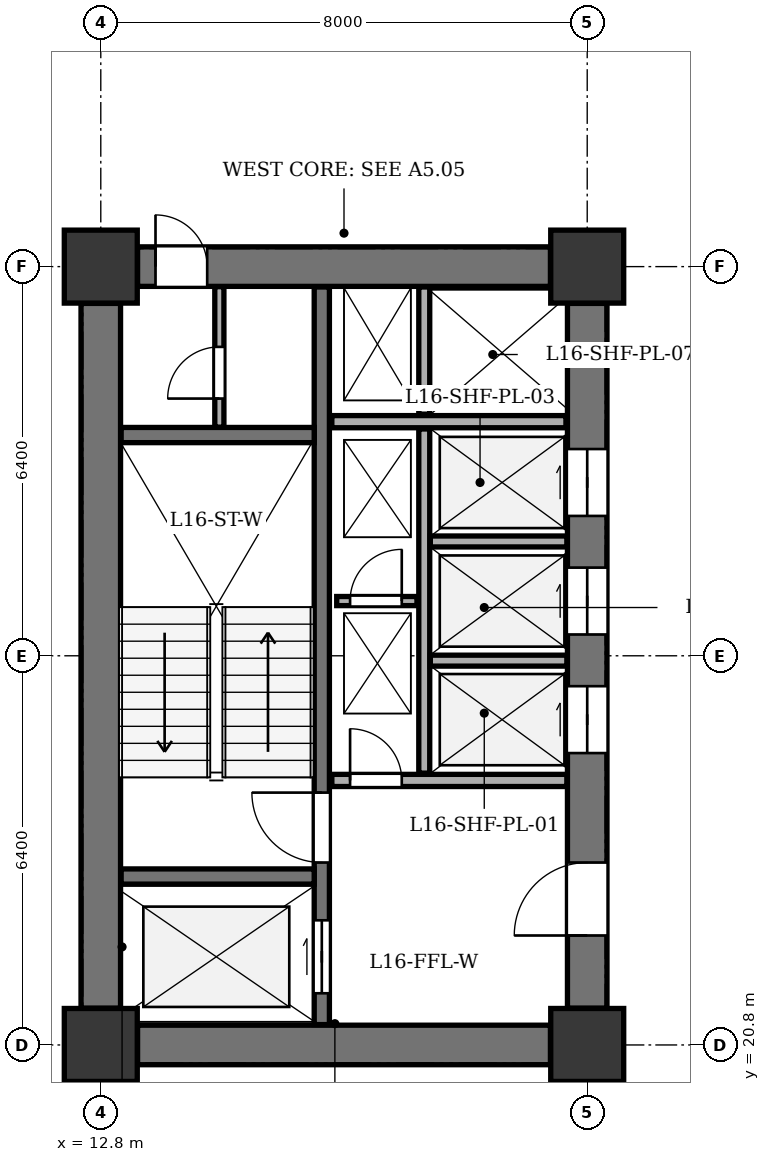
"""IFC4 building model, lengths in metres.
Left out: names, types, materials, properties, quantities, classifications, styles, units other than length and angle.
Written with IfcOpenShell. Run it as: python <this file> out.ifc"""

import sys

from ifc_helpers import new_model, si_unit, direction, frame, frame_2d, origin, origin_2d, place, context, subcontext, project, spatial, rectangle, extrude, element, fill, save


model = new_model("IFC4")
c1 = context("Model", 3, precision=1e-05, world=origin(), true_north=direction((0.0, 1.0)))
c2 = subcontext(c1, "Body", "Model", "MODEL_VIEW")
j1 = project(units=[si_unit("LENGTHUNIT", "METRE"), si_unit("PLANEANGLEUNIT", "RADIAN")], contexts=[c1])
p1 = place(None, origin())
s1 = spatial("IfcSite", under=j1, at=p1, CompositionType="ELEMENT")
p2 = place(p1, origin())
s2 = spatial("IfcBuilding", under=s1, at=p2, CompositionType="ELEMENT")
p3 = place(p2, frame((0.0, 0.0, 67.2)))
s3 = spatial("IfcBuildingStorey", under=s2, at=p3, CompositionType="ELEMENT", Elevation=67.2)
for number, where, z_axis, x_axis in (
    (1, (12.8, 20.8, 0.0), (0.0, 0.0, 1.0), (1.0, 0.0, 0.0)),
    (2, (20.8, 20.8, 0.0), (0.0, 0.0, 1.0), (1.0, 0.0, 0.0)),
    (3, (12.8, 33.6, 0.0), (0.0, 0.0, 1.0), (1.0, 0.0, 0.0)),
    (4, (20.8, 33.6, 0.0), (0.0, 0.0, 1.0), (1.0, 0.0, 0.0)),
):
    element("IfcColumn", number, at=place(p3, frame(where, z_axis=z_axis, x_axis=x_axis)), inside=s3, PredefinedType="COLUMN", context=c2, shape_type="SweptSolid", body=[
        extrude(rectangle(XDim=1.2, YDim=1.2, at=origin_2d()), origin(), (0.0, 0.0, 1.0), 3.9),
    ])
p4 = place(p3, frame((12.8, 21.405, 0.0), z_axis=(0.0, 0.0, 1.0), x_axis=(0.0, 1.0, 0.0)))
e5 = element("IfcWall", 5, at=p4, inside=s3, PredefinedType="SHEAR", context=c2, shape_type="SweptSolid", body=[
    extrude(rectangle(XDim=11.59, YDim=0.65, at=frame_2d((5.795, 0.0))), origin(), (0.0, 0.0, 1.0), 3.45),
])
p5 = place(p3, frame((13.405, 20.8, 0.0), z_axis=(0.0, 0.0, 1.0), x_axis=(1.0, 0.0, 0.0)))
e6 = element("IfcWall", 6, at=p5, inside=s3, PredefinedType="SHEAR", context=c2, shape_type="SweptSolid", body=[
    extrude(rectangle(XDim=6.79, YDim=0.65, at=frame_2d((3.395, 0.0))), origin(), (0.0, 0.0, 1.0), 3.45),
])
p6 = place(p3, frame((13.405, 33.6, 0.0), z_axis=(0.0, 0.0, 1.0), x_axis=(1.0, 0.0, 0.0)))
e7 = element("IfcWall", 7, at=p6, inside=s3, PredefinedType="SHEAR", context=c2, shape_type="SweptSolid", body=[
    extrude(rectangle(XDim=6.79, YDim=0.65, at=frame_2d((3.395, 0.0))), origin(), (0.0, 0.0, 1.0), 3.45),
])
p7 = place(p6, frame((0.295, 0.0, 0.0)))
e8 = element("IfcOpeningElement", 8, at=p7, cuts=e7, PredefinedType="OPENING", context=c2, shape_type="SweptSolid", body=[
    extrude(rectangle(XDim=0.85, YDim=2.02, at=frame_2d((0.425, 1.01))), frame((0.0, 0.335, 0.0), z_axis=(0.0, -1.0, 0.0), x_axis=(1.0, 0.0, 0.0)), (0.0, 0.0, 1.0), 0.67),
])
p8 = place(p3, frame((20.8, 21.405, 0.0), z_axis=(0.0, 0.0, 1.0), x_axis=(0.0, 1.0, 0.0)))
e9 = element("IfcWall", 9, at=p8, inside=s3, PredefinedType="SHEAR", context=c2, shape_type="SweptSolid", body=[
    extrude(rectangle(XDim=11.59, YDim=0.65, at=frame_2d((5.795, 0.0))), origin(), (0.0, 0.0, 1.0), 3.45),
])
p9 = place(p8, frame((1.195, 0.0, 0.0)))
e10 = element("IfcOpeningElement", 10, at=p9, cuts=e9, PredefinedType="OPENING", context=c2, shape_type="SweptSolid", body=[
    extrude(rectangle(XDim=1.2, YDim=2.15, at=frame_2d((0.6, 1.075))), frame((0.0, 0.335, 0.0), z_axis=(0.0, -1.0, 0.0), x_axis=(1.0, 0.0, 0.0)), (0.0, 0.0, 1.0), 0.67),
])
p10 = place(p8, frame((4.195, 0.0, 0.0)))
e11 = element("IfcOpeningElement", 11, at=p10, cuts=e9, PredefinedType="OPENING", context=c2, shape_type="SweptSolid", body=[
    extrude(rectangle(XDim=1.1, YDim=2.1, at=frame_2d((0.55, 1.05))), frame((0.0, 0.335, 0.0), z_axis=(0.0, -1.0, 0.0), x_axis=(1.0, 0.0, 0.0)), (0.0, 0.0, 1.0), 0.67),
])
p11 = place(p8, frame((6.145, 0.0, 0.0)))
e12 = element("IfcOpeningElement", 12, at=p11, cuts=e9, PredefinedType="OPENING", context=c2, shape_type="SweptSolid", body=[
    extrude(rectangle(XDim=1.1, YDim=2.1, at=frame_2d((0.55, 1.05))), frame((0.0, 0.335, 0.0), z_axis=(0.0, -1.0, 0.0), x_axis=(1.0, 0.0, 0.0)), (0.0, 0.0, 1.0), 0.67),
])
p12 = place(p8, frame((8.095, 0.0, 0.0)))
e13 = element("IfcOpeningElement", 13, at=p12, cuts=e9, PredefinedType="OPENING", context=c2, shape_type="SweptSolid", body=[
    extrude(rectangle(XDim=1.1, YDim=2.1, at=frame_2d((0.55, 1.05))), frame((0.0, 0.335, 0.0), z_axis=(0.0, -1.0, 0.0), x_axis=(1.0, 0.0, 0.0)), (0.0, 0.0, 1.0), 0.67),
])
p13 = place(p3, frame((16.435, 21.135, 0.0), z_axis=(0.0, 0.0, 1.0), x_axis=(0.0, 1.0, 0.0)))
e14 = element("IfcWall", 14, at=p13, inside=s3, PredefinedType="SHEAR", context=c2, shape_type="SweptSolid", body=[
    extrude(rectangle(XDim=12.13, YDim=0.25, at=frame_2d((6.065, 0.0))), origin(), (0.0, 0.0, 1.0), 3.45),
])
p14 = place(p13, frame((0.515, 0.0, 0.0)))
e15 = element("IfcOpeningElement", 15, at=p14, cuts=e14, PredefinedType="OPENING", context=c2, shape_type="SweptSolid", body=[
    extrude(rectangle(XDim=1.2, YDim=2.15, at=frame_2d((0.6, 1.075))), frame((0.0, 0.135, 0.0), z_axis=(0.0, -1.0, 0.0), x_axis=(1.0, 0.0, 0.0)), (0.0, 0.0, 1.0), 0.27),
])
p15 = place(p13, frame((2.665, 0.0, 0.0)))
e16 = element("IfcOpeningElement", 16, at=p15, cuts=e14, PredefinedType="OPENING", context=c2, shape_type="SweptSolid", body=[
    extrude(rectangle(XDim=1.15, YDim=2.15, at=frame_2d((0.575, 1.075))), frame((0.0, 0.135, 0.0), z_axis=(0.0, -1.0, 0.0), x_axis=(1.0, 0.0, 0.0)), (0.0, 0.0, 1.0), 0.27),
])
for number, where, z_axis, x_axis in (
    (17, (13.135, 23.57, 0.0), (0.0, 0.0, 1.0), (1.0, 0.0, 0.0)),
    (18, (13.135, 30.83, 0.0), (0.0, 0.0, 1.0), (1.0, 0.0, 0.0)),
):
    element("IfcWall", number, at=place(p3, frame(where, z_axis=z_axis, x_axis=x_axis)), inside=s3, PredefinedType="SHEAR", context=c2, shape_type="SweptSolid", body=[
        extrude(rectangle(XDim=3.175, YDim=0.25, at=frame_2d((1.587, 0.0))), origin(), (0.0, 0.0, 1.0), 3.45),
    ])
p16 = place(p3, frame((16.6, 25.15, 0.0), z_axis=(0.0, 0.0, 1.0), x_axis=(1.0, 0.0, 0.0)))
e19 = element("IfcWall", 19, at=p16, inside=s3, PredefinedType="SOLIDWALL", context=c2, shape_type="SweptSolid", body=[
    extrude(rectangle(XDim=3.865, YDim=0.2, at=frame_2d((1.933, 0.0))), origin(), (0.0, 0.0, 1.0), 3.45),
])
p17 = place(p16, frame((0.3, 0.0, 0.0)))
e20 = element("IfcOpeningElement", 20, at=p17, cuts=e19, PredefinedType="OPENING", context=c2, shape_type="SweptSolid", body=[
    extrude(rectangle(XDim=0.85, YDim=2.02, at=frame_2d((0.425, 1.01))), frame((0.0, 0.11, 0.0), z_axis=(0.0, -1.0, 0.0), x_axis=(1.0, 0.0, 0.0)), (0.0, 0.0, 1.0), 0.22),
])
p18 = place(p3, frame((16.6, 31.05, 0.0), z_axis=(0.0, 0.0, 1.0), x_axis=(1.0, 0.0, 0.0)))
e21 = element("IfcWall", 21, at=p18, inside=s3, PredefinedType="SOLIDWALL", context=c2, shape_type="SweptSolid", body=[
    extrude(rectangle(XDim=3.85, YDim=0.2, at=frame_2d((1.925, 0.0))), origin(), (0.0, 0.0, 1.0), 3.45),
])
p19 = place(p3, frame((18.12, 25.27, 0.0), z_axis=(0.0, 0.0, 1.0), x_axis=(0.0, 1.0, 0.0)))
e22 = element("IfcWall", 22, at=p19, inside=s3, PredefinedType="PARTITIONING", context=c2, shape_type="SweptSolid", body=[
    extrude(rectangle(XDim=5.66, YDim=0.18, at=frame_2d((2.83, 0.0))), origin(), (0.0, 0.0, 1.0), 3.45),
])
p20 = place(p3, frame((18.12, 31.17, 0.0), z_axis=(0.0, 0.0, 1.0), x_axis=(0.0, 1.0, 0.0)))
e23 = element("IfcWall", 23, at=p20, inside=s3, PredefinedType="PARTITIONING", context=c2, shape_type="SweptSolid", body=[
    extrude(rectangle(XDim=2.095, YDim=0.18, at=frame_2d((1.047, 0.0))), origin(), (0.0, 0.0, 1.0), 3.45),
])
for number, where, z_axis, x_axis in (
    (24, (18.22, 27.12, 0.0), (0.0, 0.0, 1.0), (1.0, 0.0, 0.0)),
    (25, (18.22, 29.08, 0.0), (0.0, 0.0, 1.0), (1.0, 0.0, 0.0)),
):
    element("IfcWall", number, at=place(p3, frame(where, z_axis=z_axis, x_axis=x_axis)), inside=s3, PredefinedType="PARTITIONING", context=c2, shape_type="SweptSolid", body=[
        extrude(rectangle(XDim=2.245, YDim=0.18, at=frame_2d((1.123, 0.0))), origin(), (0.0, 0.0, 1.0), 3.45),
    ])
p21 = place(p3, frame((14.75, 30.96, 0.0), z_axis=(0.0, 0.0, 1.0), x_axis=(0.0, 1.0, 0.0)))
e26 = element("IfcWall", 26, at=p21, inside=s3, PredefinedType="PARTITIONING", context=c2, shape_type="SweptSolid", body=[
    extrude(rectangle(XDim=2.31, YDim=0.15, at=frame_2d((1.155, 0.0))), origin(), (0.0, 0.0, 1.0), 3.45),
])
p22 = place(p21, frame((0.47, 0.0, 0.0)))
e27 = element("IfcOpeningElement", 27, at=p22, cuts=e26, PredefinedType="OPENING", context=c2, shape_type="SweptSolid", body=[
    extrude(rectangle(XDim=0.85, YDim=2.02, at=frame_2d((0.425, 1.01))), frame((0.0, 0.085, 0.0), z_axis=(0.0, -1.0, 0.0), x_axis=(1.0, 0.0, 0.0)), (0.0, 0.0, 1.0), 0.17),
])
p23 = place(p3, frame((16.68, 28.1, 0.0), z_axis=(0.0, 0.0, 1.0), x_axis=(1.0, 0.0, 0.0)))
e28 = element("IfcWall", 28, at=p23, inside=s3, PredefinedType="PARTITIONING", context=c2, shape_type="SweptSolid", body=[
    extrude(rectangle(XDim=1.32, YDim=0.15, at=frame_2d((0.66, 0.0))), origin(), (0.0, 0.0, 1.0), 3.45),
])
p24 = place(p23, frame((0.22, 0.0, 0.0)))
e29 = element("IfcOpeningElement", 29, at=p24, cuts=e28, PredefinedType="OPENING", context=c2, shape_type="SweptSolid", body=[
    extrude(rectangle(XDim=0.85, YDim=2.02, at=frame_2d((0.425, 1.01))), frame((0.0, 0.085, 0.0), z_axis=(0.0, -1.0, 0.0), x_axis=(1.0, 0.0, 0.0)), (0.0, 0.0, 1.0), 0.17),
])
p25 = place(p7, origin())
e30 = element("IfcDoor", 30, at=p25, inside=s3, OperationType="SINGLE_SWING_LEFT", PredefinedType="DOOR", context=c2, shape_type="SweptSolid", body=[
    extrude(rectangle(XDim=0.85, YDim=2.02, at=frame_2d((0.425, 1.01))), frame((0.0, 0.025, 0.0), z_axis=(0.0, -1.0, 0.0), x_axis=(1.0, 0.0, 0.0)), (0.0, 0.0, 1.0), 0.05),
])
fill(e8, e30)
p26 = place(p9, origin())
e31 = element("IfcDoor", 31, at=p26, inside=s3, OperationType="SINGLE_SWING_LEFT", PredefinedType="DOOR", context=c2, shape_type="SweptSolid", body=[
    extrude(rectangle(XDim=1.2, YDim=2.15, at=frame_2d((0.6, 1.075))), frame((0.0, 0.025, 0.0), z_axis=(0.0, -1.0, 0.0), x_axis=(1.0, 0.0, 0.0)), (0.0, 0.0, 1.0), 0.05),
])
fill(e10, e31)
p27 = place(p10, origin())
e32 = element("IfcDoor", 32, at=p27, inside=s3, OperationType="DOUBLE_DOOR_SLIDING", PredefinedType="DOOR", context=c2, shape_type="SweptSolid", body=[
    extrude(rectangle(XDim=1.1, YDim=2.1, at=frame_2d((0.55, 1.05))), frame((0.0, 0.025, 0.0), z_axis=(0.0, -1.0, 0.0), x_axis=(1.0, 0.0, 0.0)), (0.0, 0.0, 1.0), 0.05),
])
fill(e11, e32)
p28 = place(p11, origin())
e33 = element("IfcDoor", 33, at=p28, inside=s3, OperationType="DOUBLE_DOOR_SLIDING", PredefinedType="DOOR", context=c2, shape_type="SweptSolid", body=[
    extrude(rectangle(XDim=1.1, YDim=2.1, at=frame_2d((0.55, 1.05))), frame((0.0, 0.025, 0.0), z_axis=(0.0, -1.0, 0.0), x_axis=(1.0, 0.0, 0.0)), (0.0, 0.0, 1.0), 0.05),
])
fill(e12, e33)
p29 = place(p12, origin())
e34 = element("IfcDoor", 34, at=p29, inside=s3, OperationType="DOUBLE_DOOR_SLIDING", PredefinedType="DOOR", context=c2, shape_type="SweptSolid", body=[
    extrude(rectangle(XDim=1.1, YDim=2.1, at=frame_2d((0.55, 1.05))), frame((0.0, 0.025, 0.0), z_axis=(0.0, -1.0, 0.0), x_axis=(1.0, 0.0, 0.0)), (0.0, 0.0, 1.0), 0.05),
])
fill(e13, e34)
p30 = place(p14, origin())
e35 = element("IfcDoor", 35, at=p30, inside=s3, OperationType="DOUBLE_DOOR_SLIDING", PredefinedType="DOOR", context=c2, shape_type="SweptSolid", body=[
    extrude(rectangle(XDim=1.2, YDim=2.15, at=frame_2d((0.6, 1.075))), frame((0.0, 0.025, 0.0), z_axis=(0.0, -1.0, 0.0), x_axis=(1.0, 0.0, 0.0)), (0.0, 0.0, 1.0), 0.05),
])
fill(e15, e35)
p31 = place(p15, origin())
e36 = element("IfcDoor", 36, at=p31, inside=s3, OperationType="SINGLE_SWING_RIGHT", PredefinedType="DOOR", context=c2, shape_type="SweptSolid", body=[
    extrude(rectangle(XDim=1.15, YDim=2.15, at=frame_2d((0.575, 1.075))), frame((0.0, 0.025, 0.0), z_axis=(0.0, -1.0, 0.0), x_axis=(1.0, 0.0, 0.0)), (0.0, 0.0, 1.0), 0.05),
])
fill(e16, e36)
p32 = place(p17, origin())
e37 = element("IfcDoor", 37, at=p32, inside=s3, OperationType="SINGLE_SWING_LEFT", PredefinedType="DOOR", context=c2, shape_type="SweptSolid", body=[
    extrude(rectangle(XDim=0.85, YDim=2.02, at=frame_2d((0.425, 1.01))), frame((0.0, 0.025, 0.0), z_axis=(0.0, -1.0, 0.0), x_axis=(1.0, 0.0, 0.0)), (0.0, 0.0, 1.0), 0.05),
])
fill(e20, e37)
p33 = place(p22, origin())
e38 = element("IfcDoor", 38, at=p33, inside=s3, OperationType="SINGLE_SWING_LEFT", PredefinedType="DOOR", context=c2, shape_type="SweptSolid", body=[
    extrude(rectangle(XDim=0.85, YDim=2.02, at=frame_2d((0.425, 1.01))), frame((0.0, 0.025, 0.0), z_axis=(0.0, -1.0, 0.0), x_axis=(1.0, 0.0, 0.0)), (0.0, 0.0, 1.0), 0.05),
])
fill(e27, e38)
p34 = place(p24, origin())
e39 = element("IfcDoor", 39, at=p34, inside=s3, OperationType="SINGLE_SWING_RIGHT", PredefinedType="DOOR", context=c2, shape_type="SweptSolid", body=[
    extrude(rectangle(XDim=0.85, YDim=2.02, at=frame_2d((0.425, 1.01))), frame((0.0, 0.025, 0.0), z_axis=(0.0, -1.0, 0.0), x_axis=(1.0, 0.0, 0.0)), (0.0, 0.0, 1.0), 0.05),
])
fill(e29, e39)
save(model, sys.argv[1])
